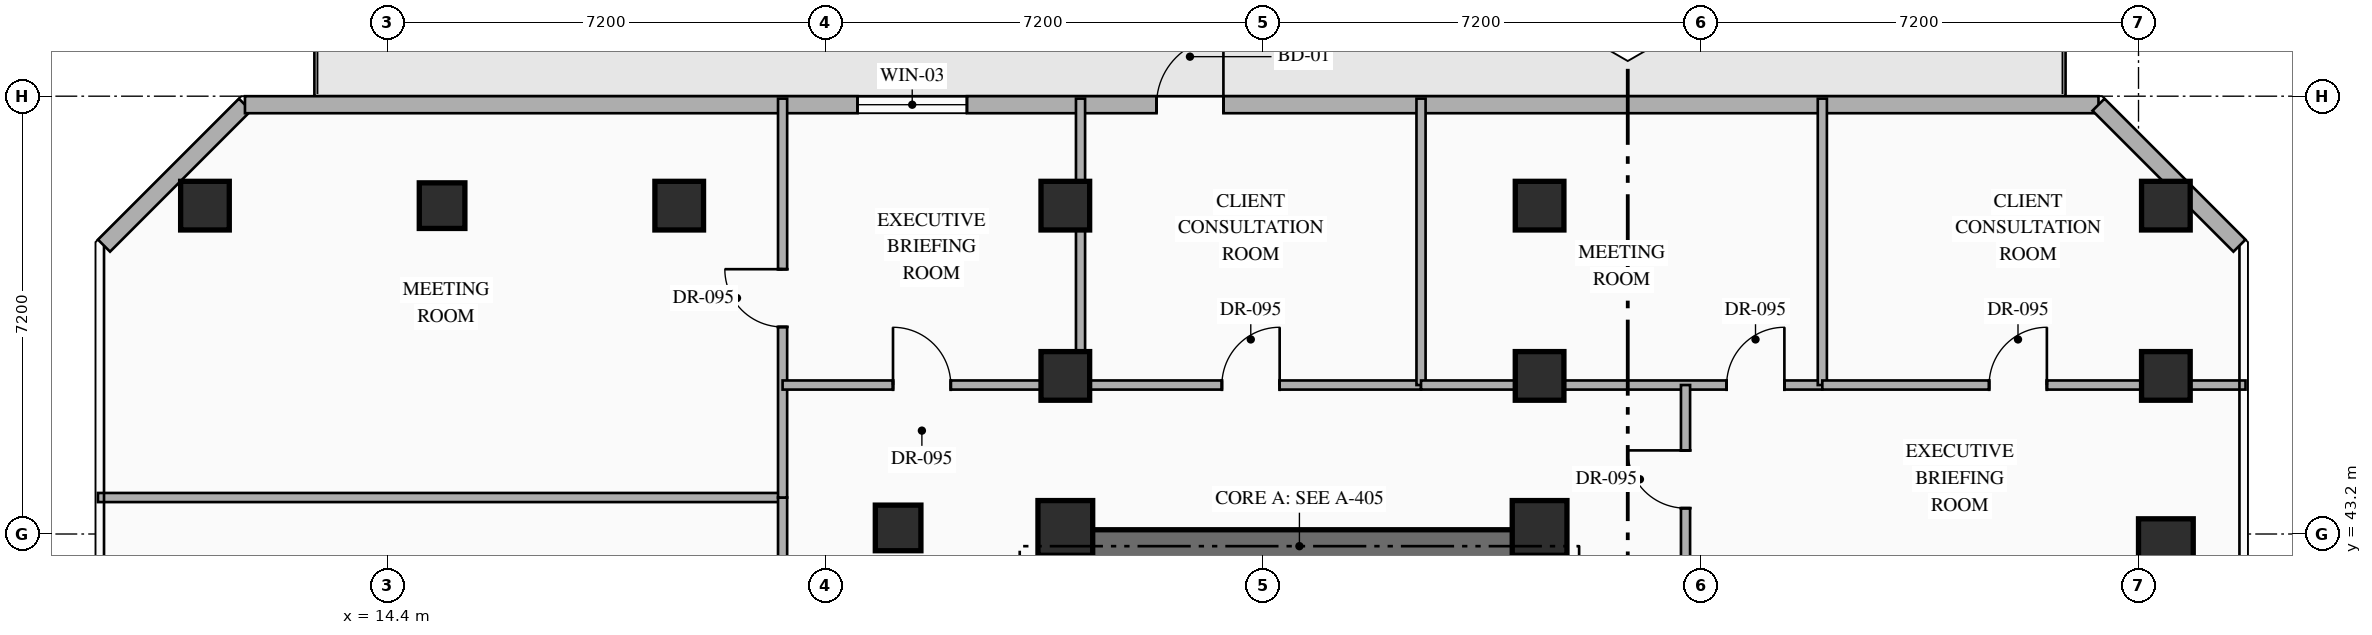
"""IFC4 building model, lengths in metres.
Left out: names, types, materials, properties, quantities, classifications, styles, units other than length and angle.
Written with IfcOpenShell. Run it as: python <this file> out.ifc"""

import sys

from ifc_helpers import new_model, si_unit, direction, frame, frame_2d, origin, origin_2d, place, context, subcontext, project, spatial, rectangle, hollow_rectangle, extrude, element, fill, save


model = new_model("IFC4")
c1 = context("Model", 3, precision=1e-05, world=origin(), true_north=direction((0.0, 1.0)))
c2 = subcontext(c1, "Body", "Model", "MODEL_VIEW")
j1 = project(units=[si_unit("LENGTHUNIT", "METRE"), si_unit("PLANEANGLEUNIT", "RADIAN")], contexts=[c1])
p1 = place(None, origin())
s1 = spatial("IfcSite", under=j1, at=p1, CompositionType="ELEMENT")
p2 = place(p1, origin())
s2 = spatial("IfcBuilding", under=s1, at=p2, CompositionType="ELEMENT")
p3 = place(p2, frame((0.0, 0.0, 163.65)))
s3 = spatial("IfcBuildingStorey", under=s2, at=p3, CompositionType="ELEMENT", Elevation=163.65)
p4 = place(p3, frame((25.62, 42.97, 0.0), z_axis=(0.0, 0.0, 1.0), x_axis=(1.0, 0.0, 0.0)))
e1 = element("IfcWall", 1, at=p4, inside=s3, PredefinedType="SHEAR", context=c2, shape_type="SweptSolid", body=[
    extrude(rectangle(XDim=7.78, YDim=0.6, at=frame_2d((3.89, 0.0))), origin(), (0.0, 0.0, 1.0), 3.6),
])
for number, where, z_axis, x_axis in (
    (2, (25.55, 43.3, 0.0), (0.0, 0.0, 1.0), (1.0, 0.0, 0.0)),
    (3, (33.35, 43.3, 0.0), (0.0, 0.0, 1.0), (1.0, 0.0, 0.0)),
    (4, (43.65, 43.0, 0.0), (0.0, 0.0, 1.0), (1.0, 0.0, 0.0)),
):
    element("IfcColumn", number, at=place(p3, frame(where, z_axis=z_axis, x_axis=x_axis)), inside=s3, PredefinedType="COLUMN", context=c2, shape_type="SweptSolid", body=[
        extrude(rectangle(XDim=0.9, YDim=0.9, at=origin_2d()), origin(), (0.0, 0.0, 1.0), 3.6),
    ])
for number, where, z_axis, x_axis in (
    (5, (25.55, 45.8, 0.0), (0.0, 0.0, 1.0), (1.0, 0.0, 0.0)),
    (6, (33.35, 45.8, 0.0), (0.0, 0.0, 1.0), (1.0, 0.0, 0.0)),
    (7, (43.65, 45.8, 0.0), (0.0, 0.0, 1.0), (1.0, 0.0, 0.0)),
    (8, (11.4, 48.6, 0.0), (0.0, 0.0, 1.0), (1.0, 0.0, 0.0)),
    (9, (19.2, 48.6, 0.0), (0.0, 0.0, 1.0), (1.0, 0.0, 0.0)),
    (10, (25.55, 48.6, 0.0), (0.0, 0.0, 1.0), (1.0, 0.0, 0.0)),
    (11, (33.35, 48.6, 0.0), (0.0, 0.0, 1.0), (1.0, 0.0, 0.0)),
    (12, (43.65, 48.6, 0.0), (0.0, 0.0, 1.0), (1.0, 0.0, 0.0)),
):
    element("IfcColumn", number, at=place(p3, frame(where, z_axis=z_axis, x_axis=x_axis)), inside=s3, PredefinedType="COLUMN", context=c2, shape_type="SweptSolid", body=[
        extrude(hollow_rectangle(XDim=0.8, YDim=0.8, WallThickness=0.032, at=origin_2d()), origin(), (0.0, 0.0, 1.0), 3.6),
    ])
for number, where, z_axis, x_axis in (
    (13, (22.8, 43.3, 0.0), (0.0, 0.0, 1.0), (1.0, 0.0, 0.0)),
    (14, (15.3, 48.6, 0.0), (0.0, 0.0, 1.0), (1.0, 0.0, 0.0)),
):
    element("IfcColumn", number, at=place(p3, frame(where, z_axis=z_axis, x_axis=x_axis)), inside=s3, PredefinedType="COLUMN", context=c2, shape_type="SweptSolid", body=[
        extrude(hollow_rectangle(XDim=0.75, YDim=0.75, WallThickness=0.028, at=origin_2d()), origin(), (0.0, 0.0, 1.0), 3.6),
    ])
p5 = place(p3, frame((9.74, 47.942, 0.0), z_axis=(0.0, 0.0, 1.0), x_axis=(0.707106781187, 0.707106781187, 0.0)))
e15 = element("IfcWall", 15, at=p5, inside=s3, PredefinedType="STANDARD", context=c2, shape_type="SweptSolid", body=[
    extrude(rectangle(XDim=3.278, YDim=0.28, at=frame_2d((1.639, 0.0))), origin(), (0.0, 0.0, 1.0), 3.35),
])
p6 = place(p3, frame((12.058, 50.26, 0.0), z_axis=(0.0, 0.0, 1.0), x_axis=(1.0, 0.0, 0.0)))
e16 = element("IfcWall", 16, at=p6, inside=s3, PredefinedType="STANDARD", context=c2, shape_type="SweptSolid", body=[
    extrude(rectangle(XDim=30.484, YDim=0.28, at=frame_2d((15.242, 0.0))), origin(), (0.0, 0.0, 1.0), 3.35),
])
p7 = place(p6, frame((14.992, 0.0, 0.0)))
e17 = element("IfcOpeningElement", 17, at=p7, cuts=e16, PredefinedType="OPENING", context=c2, shape_type="SweptSolid", body=[
    extrude(rectangle(XDim=1.1, YDim=2.2, at=frame_2d((0.55, 1.1))), frame((0.0, 0.15, 0.0), z_axis=(0.0, -1.0, 0.0), x_axis=(1.0, 0.0, 0.0)), (0.0, 0.0, 1.0), 0.3),
])
p8 = place(p6, frame((10.074, 0.0, 0.85)))
e18 = element("IfcOpeningElement", 18, at=p8, cuts=e16, PredefinedType="OPENING", context=c2, shape_type="SweptSolid", body=[
    extrude(rectangle(XDim=1.8, YDim=2.1, at=frame_2d((0.9, 1.05))), frame((0.0, 0.15, 0.0), z_axis=(0.0, -1.0, 0.0), x_axis=(1.0, 0.0, 0.0)), (0.0, 0.0, 1.0), 0.3),
])
p9 = place(p3, frame((42.542, 50.26, 0.0), z_axis=(0.0, 0.0, 1.0), x_axis=(0.707106781187, -0.707106781187, 0.0)))
e19 = element("IfcWall", 19, at=p9, inside=s3, PredefinedType="STANDARD", context=c2, shape_type="SweptSolid", body=[
    extrude(rectangle(XDim=3.278, YDim=0.28, at=frame_2d((1.639, 0.0))), origin(), (0.0, 0.0, 1.0), 3.35),
])
p10 = place(p3, frame((9.64, 43.8, 0.0), z_axis=(0.0, 0.0, 1.0), x_axis=(1.0, 0.0, 0.0)))
e20 = element("IfcWall", 20, at=p10, inside=s3, PredefinedType="PARTITIONING", context=c2, shape_type="SweptSolid", body=[
    extrude(rectangle(XDim=11.26, YDim=0.15, at=frame_2d((5.63, 0.0))), origin(), (0.0, 0.0, 1.0), 3.35),
])
p11 = place(p3, frame((20.9, 37.4, 0.0), z_axis=(0.0, 0.0, 1.0), x_axis=(0.0, 1.0, 0.0)))
e21 = element("IfcWall", 21, at=p11, inside=s3, PredefinedType="PARTITIONING", context=c2, shape_type="SweptSolid", body=[
    extrude(rectangle(XDim=6.4, YDim=0.15, at=frame_2d((3.2, 0.0))), origin(), (0.0, 0.0, 1.0), 3.35),
])
p12 = place(p11, frame((3.428, 0.0, 0.0)))
e22 = element("IfcOpeningElement", 22, at=p12, cuts=e21, PredefinedType="OPENING", context=c2, shape_type="SweptSolid", body=[
    extrude(rectangle(XDim=0.95, YDim=2.15, at=frame_2d((0.475, 1.075))), frame((0.0, 0.085, 0.0), z_axis=(0.0, -1.0, 0.0), x_axis=(1.0, 0.0, 0.0)), (0.0, 0.0, 1.0), 0.17),
])
p13 = place(p3, frame((20.9, 43.8, 0.0), z_axis=(0.0, 0.0, 1.0), x_axis=(0.0, 1.0, 0.0)))
e23 = element("IfcWall", 23, at=p13, inside=s3, PredefinedType="PARTITIONING", context=c2, shape_type="SweptSolid", body=[
    extrude(rectangle(XDim=6.56, YDim=0.15, at=frame_2d((3.28, 0.0))), origin(), (0.0, 0.0, 1.0), 3.35),
])
p14 = place(p13, frame((2.805, 0.0, 0.0)))
e24 = element("IfcOpeningElement", 24, at=p14, cuts=e23, PredefinedType="OPENING", context=c2, shape_type="SweptSolid", body=[
    extrude(rectangle(XDim=0.95, YDim=2.15, at=frame_2d((0.475, 1.075))), frame((0.0, 0.085, 0.0), z_axis=(0.0, -1.0, 0.0), x_axis=(1.0, 0.0, 0.0)), (0.0, 0.0, 1.0), 0.17),
])
p15 = place(p3, frame((20.9, 45.65, 0.0), z_axis=(0.0, 0.0, 1.0), x_axis=(1.0, 0.0, 0.0)))
e25 = element("IfcWall", 25, at=p15, inside=s3, PredefinedType="PARTITIONING", context=c2, shape_type="SweptSolid", body=[
    extrude(rectangle(XDim=4.9, YDim=0.15, at=frame_2d((2.45, 0.0))), origin(), (0.0, 0.0, 1.0), 2.695),
])
p16 = place(p15, frame((1.816, 0.0, 0.0)))
e26 = element("IfcOpeningElement", 26, at=p16, cuts=e25, PredefinedType="OPENING", context=c2, shape_type="SweptSolid", body=[
    extrude(rectangle(XDim=0.95, YDim=2.15, at=frame_2d((0.475, 1.075))), frame((0.0, 0.085, 0.0), z_axis=(0.0, -1.0, 0.0), x_axis=(1.0, 0.0, 0.0)), (0.0, 0.0, 1.0), 0.17),
])
p17 = place(p3, frame((25.8, 45.65, 0.0), z_axis=(0.0, 0.0, 1.0), x_axis=(0.0, 1.0, 0.0)))
e27 = element("IfcWall", 27, at=p17, inside=s3, PredefinedType="PARTITIONING", context=c2, shape_type="SweptSolid", body=[
    extrude(rectangle(XDim=4.71, YDim=0.15, at=frame_2d((2.355, 0.0))), origin(), (0.0, 0.0, 1.0), 3.35),
])
p18 = place(p3, frame((25.8, 45.65, 0.0), z_axis=(0.0, 0.0, 1.0), x_axis=(1.0, 0.0, 0.0)))
e28 = element("IfcWall", 28, at=p18, inside=s3, PredefinedType="PARTITIONING", context=c2, shape_type="SweptSolid", body=[
    extrude(rectangle(XDim=5.6, YDim=0.15, at=frame_2d((2.8, 0.0))), origin(), (0.0, 0.0, 1.0), 2.695),
])
p19 = place(p18, frame((2.325, 0.0, 0.0)))
e29 = element("IfcOpeningElement", 29, at=p19, cuts=e28, PredefinedType="OPENING", context=c2, shape_type="SweptSolid", body=[
    extrude(rectangle(XDim=0.95, YDim=2.15, at=frame_2d((0.475, 1.075))), frame((0.0, 0.085, 0.0), z_axis=(0.0, -1.0, 0.0), x_axis=(1.0, 0.0, 0.0)), (0.0, 0.0, 1.0), 0.17),
])
p20 = place(p3, frame((31.4, 45.65, 0.0), z_axis=(0.0, 0.0, 1.0), x_axis=(0.0, 1.0, 0.0)))
e30 = element("IfcWall", 30, at=p20, inside=s3, PredefinedType="PARTITIONING", context=c2, shape_type="SweptSolid", body=[
    extrude(rectangle(XDim=4.71, YDim=0.15, at=frame_2d((2.355, 0.0))), origin(), (0.0, 0.0, 1.0), 3.35),
])
p21 = place(p3, frame((31.4, 45.65, 0.0), z_axis=(0.0, 0.0, 1.0), x_axis=(1.0, 0.0, 0.0)))
e31 = element("IfcWall", 31, at=p21, inside=s3, PredefinedType="PARTITIONING", context=c2, shape_type="SweptSolid", body=[
    extrude(rectangle(XDim=6.6, YDim=0.15, at=frame_2d((3.3, 0.0))), origin(), (0.0, 0.0, 1.0), 2.695),
])
p22 = place(p21, frame((5.026, 0.0, 0.0)))
e32 = element("IfcOpeningElement", 32, at=p22, cuts=e31, PredefinedType="OPENING", context=c2, shape_type="SweptSolid", body=[
    extrude(rectangle(XDim=0.95, YDim=2.15, at=frame_2d((0.475, 1.075))), frame((0.0, 0.085, 0.0), z_axis=(0.0, -1.0, 0.0), x_axis=(1.0, 0.0, 0.0)), (0.0, 0.0, 1.0), 0.17),
])
p23 = place(p3, frame((38.0, 45.65, 0.0), z_axis=(0.0, 0.0, 1.0), x_axis=(0.0, 1.0, 0.0)))
e33 = element("IfcWall", 33, at=p23, inside=s3, PredefinedType="PARTITIONING", context=c2, shape_type="SweptSolid", body=[
    extrude(rectangle(XDim=4.71, YDim=0.15, at=frame_2d((2.355, 0.0))), origin(), (0.0, 0.0, 1.0), 3.35),
])
p24 = place(p3, frame((38.0, 45.65, 0.0), z_axis=(0.0, 0.0, 1.0), x_axis=(1.0, 0.0, 0.0)))
e34 = element("IfcWall", 34, at=p24, inside=s3, PredefinedType="PARTITIONING", context=c2, shape_type="SweptSolid", body=[
    extrude(rectangle(XDim=6.96, YDim=0.15, at=frame_2d((3.48, 0.0))), origin(), (0.0, 0.0, 1.0), 2.695),
])
p25 = place(p24, frame((2.743, 0.0, 0.0)))
e35 = element("IfcOpeningElement", 35, at=p25, cuts=e34, PredefinedType="OPENING", context=c2, shape_type="SweptSolid", body=[
    extrude(rectangle(XDim=0.95, YDim=2.15, at=frame_2d((0.475, 1.075))), frame((0.0, 0.085, 0.0), z_axis=(0.0, -1.0, 0.0), x_axis=(1.0, 0.0, 0.0)), (0.0, 0.0, 1.0), 0.17),
])
p26 = place(p3, frame((35.75, 42.55, 0.0), z_axis=(0.0, 0.0, 1.0), x_axis=(0.0, 1.0, 0.0)))
e36 = element("IfcWall", 36, at=p26, inside=s3, PredefinedType="PARTITIONING", context=c2, shape_type="SweptSolid", body=[
    extrude(rectangle(XDim=3.1, YDim=0.15, at=frame_2d((1.55, 0.0))), origin(), (0.0, 0.0, 1.0), 3.35),
])
p27 = place(p26, frame((1.075, 0.0, 0.0)))
e37 = element("IfcOpeningElement", 37, at=p27, cuts=e36, PredefinedType="OPENING", context=c2, shape_type="SweptSolid", body=[
    extrude(rectangle(XDim=0.95, YDim=2.15, at=frame_2d((0.475, 1.075))), frame((0.0, 0.085, 0.0), z_axis=(0.0, -1.0, 0.0), x_axis=(1.0, 0.0, 0.0)), (0.0, 0.0, 1.0), 0.17),
])
p28 = place(p7, origin())
e38 = element("IfcDoor", 38, at=p28, inside=s3, OperationType="SINGLE_SWING_RIGHT", PredefinedType="DOOR", context=c2, shape_type="SweptSolid", body=[
    extrude(rectangle(XDim=1.1, YDim=2.2, at=frame_2d((0.55, 1.1))), frame((0.0, 0.025, 0.0), z_axis=(0.0, -1.0, 0.0), x_axis=(1.0, 0.0, 0.0)), (0.0, 0.0, 1.0), 0.05),
])
fill(e17, e38)
p29 = place(p8, origin())
e39 = element("IfcWindow", 39, at=p29, inside=s3, PartitioningType="SINGLE_PANEL", PredefinedType="WINDOW", context=c2, shape_type="SweptSolid", body=[
    extrude(rectangle(XDim=1.8, YDim=2.1, at=frame_2d((0.9, 1.05))), frame((0.0, 0.03, 0.0), z_axis=(0.0, -1.0, 0.0), x_axis=(1.0, 0.0, 0.0)), (0.0, 0.0, 1.0), 0.06),
])
fill(e18, e39)
p30 = place(p14, origin())
e40 = element("IfcDoor", 40, at=p30, inside=s3, OperationType="SINGLE_SWING_RIGHT", PredefinedType="DOOR", context=c2, shape_type="SweptSolid", body=[
    extrude(rectangle(XDim=0.95, YDim=2.15, at=frame_2d((0.475, 1.075))), frame((0.0, 0.025, 0.0), z_axis=(0.0, -1.0, 0.0), x_axis=(1.0, 0.0, 0.0)), (0.0, 0.0, 1.0), 0.05),
])
fill(e24, e40)
p31 = place(p16, origin())
e41 = element("IfcDoor", 41, at=p31, inside=s3, OperationType="SINGLE_SWING_LEFT", PredefinedType="DOOR", context=c2, shape_type="SweptSolid", body=[
    extrude(rectangle(XDim=0.95, YDim=2.15, at=frame_2d((0.475, 1.075))), frame((0.0, 0.025, 0.0), z_axis=(0.0, -1.0, 0.0), x_axis=(1.0, 0.0, 0.0)), (0.0, 0.0, 1.0), 0.05),
])
fill(e26, e41)
p32 = place(p19, origin())
e42 = element("IfcDoor", 42, at=p32, inside=s3, OperationType="SINGLE_SWING_RIGHT", PredefinedType="DOOR", context=c2, shape_type="SweptSolid", body=[
    extrude(rectangle(XDim=0.95, YDim=2.15, at=frame_2d((0.475, 1.075))), frame((0.0, 0.025, 0.0), z_axis=(0.0, -1.0, 0.0), x_axis=(1.0, 0.0, 0.0)), (0.0, 0.0, 1.0), 0.05),
])
fill(e29, e42)
p33 = place(p22, origin())
e43 = element("IfcDoor", 43, at=p33, inside=s3, OperationType="SINGLE_SWING_RIGHT", PredefinedType="DOOR", context=c2, shape_type="SweptSolid", body=[
    extrude(rectangle(XDim=0.95, YDim=2.15, at=frame_2d((0.475, 1.075))), frame((0.0, 0.025, 0.0), z_axis=(0.0, -1.0, 0.0), x_axis=(1.0, 0.0, 0.0)), (0.0, 0.0, 1.0), 0.05),
])
fill(e32, e43)
p34 = place(p25, origin())
e44 = element("IfcDoor", 44, at=p34, inside=s3, OperationType="SINGLE_SWING_RIGHT", PredefinedType="DOOR", context=c2, shape_type="SweptSolid", body=[
    extrude(rectangle(XDim=0.95, YDim=2.15, at=frame_2d((0.475, 1.075))), frame((0.0, 0.025, 0.0), z_axis=(0.0, -1.0, 0.0), x_axis=(1.0, 0.0, 0.0)), (0.0, 0.0, 1.0), 0.05),
])
fill(e35, e44)
p35 = place(p27, origin())
e45 = element("IfcDoor", 45, at=p35, inside=s3, OperationType="SINGLE_SWING_RIGHT", PredefinedType="DOOR", context=c2, shape_type="SweptSolid", body=[
    extrude(rectangle(XDim=0.95, YDim=2.15, at=frame_2d((0.475, 1.075))), frame((0.0, 0.025, 0.0), z_axis=(0.0, -1.0, 0.0), x_axis=(1.0, 0.0, 0.0)), (0.0, 0.0, 1.0), 0.05),
])
fill(e37, e45)
save(model, sys.argv[1])
